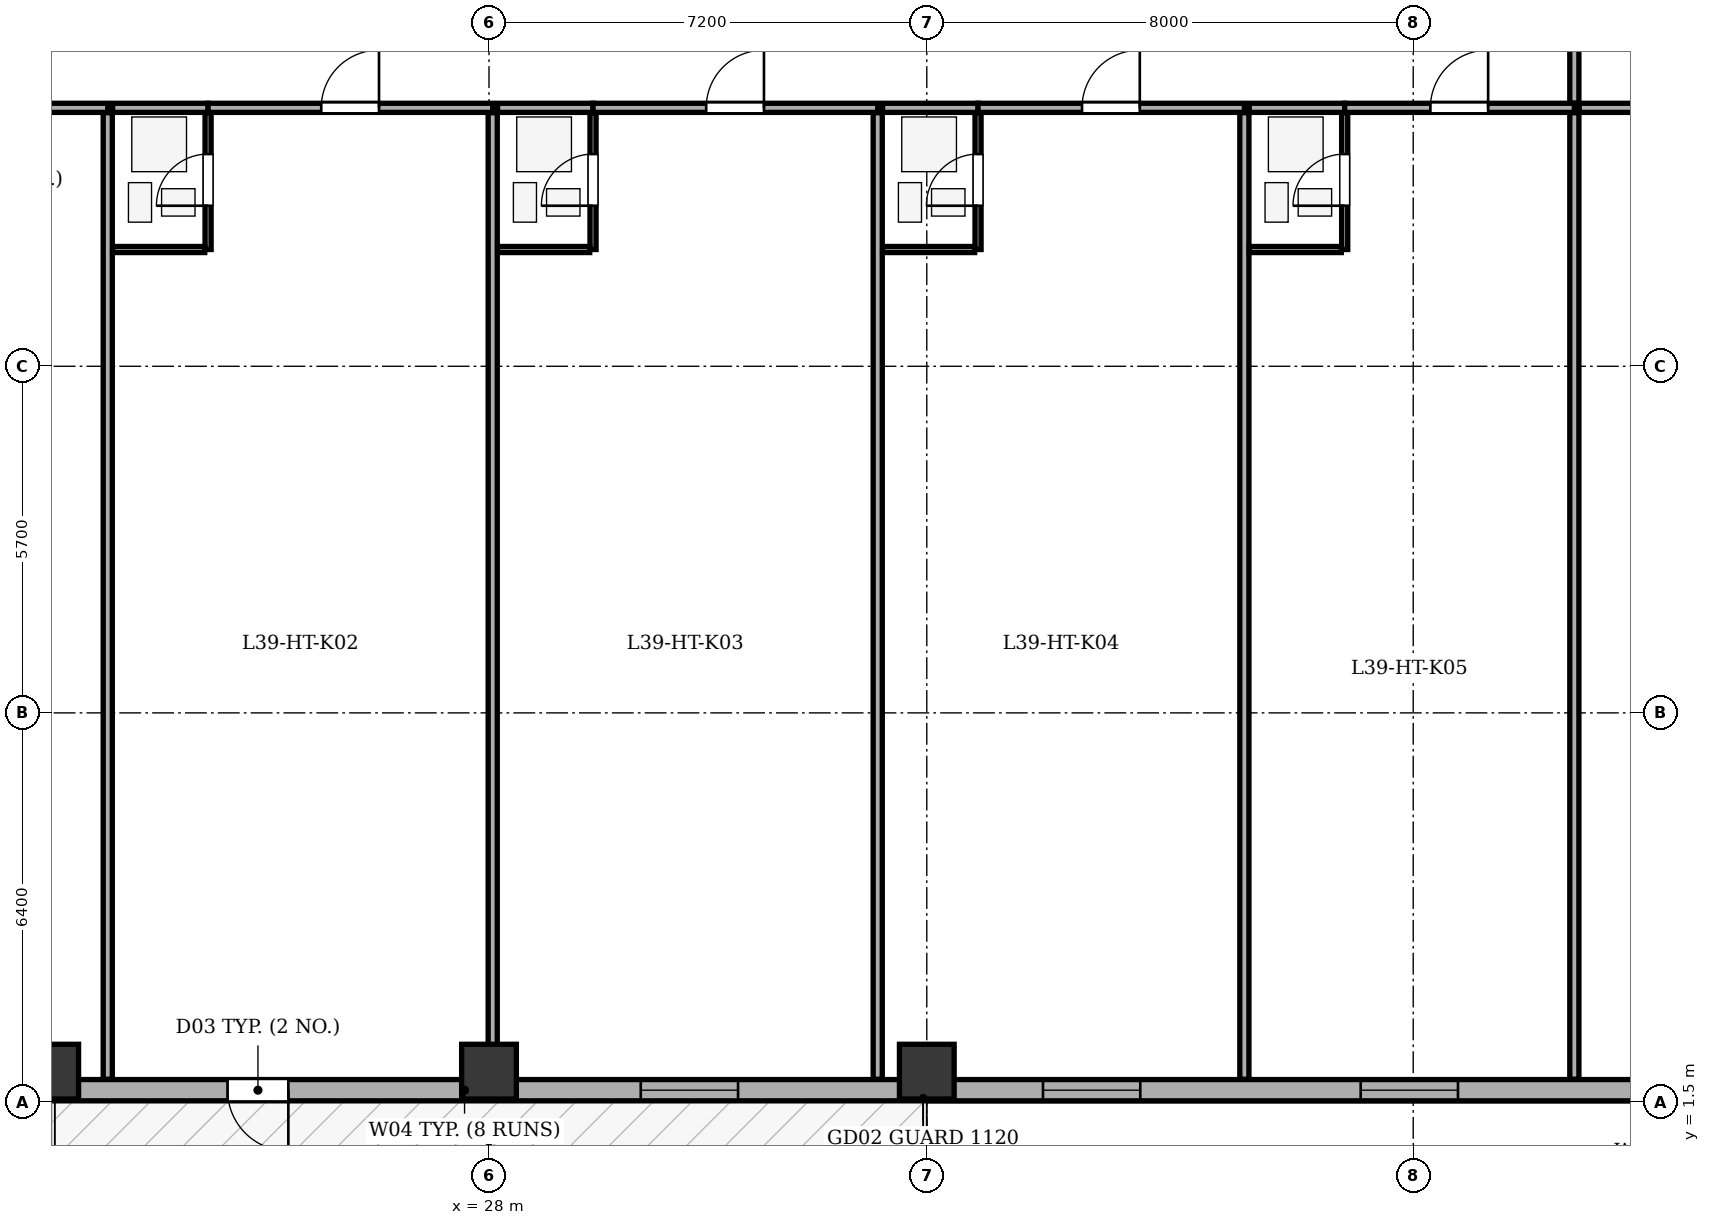
"""IFC4 building model, lengths in metres.
Left out: names, types, materials, properties, quantities, classifications, styles, units other than length and angle.
Written with IfcOpenShell. Run it as: python <this file> out.ifc"""

import sys

from ifc_helpers import new_model, si_unit, direction, frame, frame_2d, origin, origin_2d, place, context, subcontext, project, spatial, rectangle, extrude, element, fill, save


model = new_model("IFC4")
c1 = context("Model", 3, precision=1e-05, world=origin(), true_north=direction((0.0, 1.0)))
c2 = subcontext(c1, "Body", "Model", "MODEL_VIEW")
j1 = project(units=[si_unit("LENGTHUNIT", "METRE"), si_unit("PLANEANGLEUNIT", "RADIAN")], contexts=[c1])
p1 = place(None, origin())
s1 = spatial("IfcSite", under=j1, at=p1, CompositionType="ELEMENT")
p2 = place(p1, origin())
s2 = spatial("IfcBuilding", under=s1, at=p2, CompositionType="ELEMENT")
p3 = place(p2, frame((0.0, 0.0, 155.3)))
s3 = spatial("IfcBuildingStorey", under=s2, at=p3, CompositionType="ELEMENT", Elevation=155.3)
for number, where, z_axis, x_axis in (
    (1, (20.8, 2.0, 0.0), (0.0, 0.0, 1.0), (1.0, 0.0, 0.0)),
    (2, (28.0, 2.0, 0.0), (0.0, 0.0, 1.0), (1.0, 0.0, 0.0)),
    (3, (35.2, 2.0, 0.0), (0.0, 0.0, 1.0), (1.0, 0.0, 0.0)),
):
    element("IfcColumn", number, at=place(p3, frame(where, z_axis=z_axis, x_axis=x_axis)), inside=s3, PredefinedType="COLUMN", context=c2, shape_type="SweptSolid", body=[
        extrude(rectangle(XDim=0.9, YDim=0.9, at=origin_2d()), origin(), (0.0, 0.0, 1.0), 3.5),
    ])
p4 = place(p3, frame((50.7, 1.695, 0.0), z_axis=(0.0, 0.0, 1.0), x_axis=(-1.0, 0.0, 0.0)))
e4 = element("IfcWall", 4, at=p4, inside=s3, PredefinedType="STANDARD", context=c2, shape_type="SweptSolid", body=[
    extrude(rectangle(XDim=35.0, YDim=0.35, at=frame_2d((17.5, 0.0))), origin(), (0.0, 0.0, 1.0), 2.785),
])
p5 = place(p4, frame((26.0, 0.0, 0.0)))
e5 = element("IfcOpeningElement", 5, at=p5, cuts=e4, PredefinedType="OPENING", context=c2, shape_type="SweptSolid", body=[
    extrude(rectangle(XDim=1.0, YDim=2.02, at=frame_2d((0.5, 1.01))), frame((0.0, 0.185, 0.0), z_axis=(0.0, -1.0, 0.0), x_axis=(1.0, 0.0, 0.0)), (0.0, 0.0, 1.0), 0.37),
])
p6 = place(p4, frame((1.763, 0.0, 0.75)))
e6 = element("IfcOpeningElement", 6, at=p6, cuts=e4, PredefinedType="OPENING", context=c2, shape_type="SweptSolid", body=[
    extrude(rectangle(XDim=1.6, YDim=1.75, at=frame_2d((0.8, 0.875))), frame((0.0, 0.185, 0.0), z_axis=(0.0, -1.0, 0.0), x_axis=(1.0, 0.0, 0.0)), (0.0, 0.0, 1.0), 0.37),
])
p7 = place(p4, frame((6.764, 0.0, 0.75)))
e7 = element("IfcOpeningElement", 7, at=p7, cuts=e4, PredefinedType="OPENING", context=c2, shape_type="SweptSolid", body=[
    extrude(rectangle(XDim=1.6, YDim=1.75, at=frame_2d((0.8, 0.875))), frame((0.0, 0.185, 0.0), z_axis=(0.0, -1.0, 0.0), x_axis=(1.0, 0.0, 0.0)), (0.0, 0.0, 1.0), 0.37),
])
p8 = place(p4, frame((11.989, 0.0, 0.75)))
e8 = element("IfcOpeningElement", 8, at=p8, cuts=e4, PredefinedType="OPENING", context=c2, shape_type="SweptSolid", body=[
    extrude(rectangle(XDim=1.6, YDim=1.75, at=frame_2d((0.8, 0.875))), frame((0.0, 0.185, 0.0), z_axis=(0.0, -1.0, 0.0), x_axis=(1.0, 0.0, 0.0)), (0.0, 0.0, 1.0), 0.37),
])
p9 = place(p4, frame((18.604, 0.0, 0.75)))
e9 = element("IfcOpeningElement", 9, at=p9, cuts=e4, PredefinedType="OPENING", context=c2, shape_type="SweptSolid", body=[
    extrude(rectangle(XDim=1.6, YDim=1.75, at=frame_2d((0.8, 0.875))), frame((0.0, 0.185, 0.0), z_axis=(0.0, -1.0, 0.0), x_axis=(1.0, 0.0, 0.0)), (0.0, 0.0, 1.0), 0.37),
])
p10 = place(p4, frame((31.613, 0.0, 0.75)))
e10 = element("IfcOpeningElement", 10, at=p10, cuts=e4, PredefinedType="OPENING", context=c2, shape_type="SweptSolid", body=[
    extrude(rectangle(XDim=1.6, YDim=1.75, at=frame_2d((0.8, 0.875))), frame((0.0, 0.185, 0.0), z_axis=(0.0, -1.0, 0.0), x_axis=(1.0, 0.0, 0.0)), (0.0, 0.0, 1.0), 0.37),
])
p11 = place(p3, frame((17.35, 17.85, 0.0), z_axis=(0.0, 0.0, 1.0), x_axis=(1.0, 0.0, 0.0)))
e11 = element("IfcWall", 11, at=p11, inside=s3, PredefinedType="PARTITIONING", context=c2, shape_type="SweptSolid", body=[
    extrude(rectangle(XDim=4.38, YDim=0.15, at=frame_2d((2.19, 0.0))), origin(), (0.0, 0.0, 1.0), 3.2),
])
p12 = place(p11, frame((1.71, 0.0, 0.0)))
e12 = element("IfcOpeningElement", 12, at=p12, cuts=e11, PredefinedType="OPENING", context=c2, shape_type="SweptSolid", body=[
    extrude(rectangle(XDim=0.95, YDim=2.1, at=frame_2d((0.475, 1.05))), frame((0.0, 0.085, 0.0), z_axis=(0.0, -1.0, 0.0), x_axis=(1.0, 0.0, 0.0)), (0.0, 0.0, 1.0), 0.17),
])
p13 = place(p3, frame((21.73, 1.875, 0.0), z_axis=(0.0, 0.0, 1.0), x_axis=(0.0, 1.0, 0.0)))
e13 = element("IfcWall", 13, at=p13, inside=s3, PredefinedType="PARTITIONING", context=c2, shape_type="SweptSolid", body=[
    extrude(rectangle(XDim=15.895, YDim=0.15, at=frame_2d((7.948, 0.0))), origin(), (0.0, 0.0, 1.0), 3.2),
])
p14 = place(p3, frame((21.81, 17.85, 0.0), z_axis=(0.0, 0.0, 1.0), x_axis=(1.0, 0.0, 0.0)))
e14 = element("IfcWall", 14, at=p14, inside=s3, PredefinedType="PARTITIONING", context=c2, shape_type="SweptSolid", body=[
    extrude(rectangle(XDim=1.57, YDim=0.15, at=frame_2d((0.785, 0.0))), origin(), (0.0, 0.0, 1.0), 3.2),
])
p15 = place(p3, frame((23.38, 17.85, 0.0), z_axis=(0.0, 0.0, 1.0), x_axis=(1.0, 0.0, 0.0)))
e15 = element("IfcWall", 15, at=p15, inside=s3, PredefinedType="PARTITIONING", context=c2, shape_type="SweptSolid", body=[
    extrude(rectangle(XDim=4.681, YDim=0.15, at=frame_2d((2.341, 0.0))), origin(), (0.0, 0.0, 1.0), 3.2),
])
p16 = place(p15, frame((1.861, 0.0, 0.0)))
e16 = element("IfcOpeningElement", 16, at=p16, cuts=e15, PredefinedType="OPENING", context=c2, shape_type="SweptSolid", body=[
    extrude(rectangle(XDim=0.95, YDim=2.1, at=frame_2d((0.475, 1.05))), frame((0.0, 0.085, 0.0), z_axis=(0.0, -1.0, 0.0), x_axis=(1.0, 0.0, 0.0)), (0.0, 0.0, 1.0), 0.17),
])
p17 = place(p3, frame((23.38, 15.52, 0.0), z_axis=(0.0, 0.0, 1.0), x_axis=(0.0, 1.0, 0.0)))
e17 = element("IfcWall", 17, at=p17, inside=s3, PredefinedType="PARTITIONING", context=c2, shape_type="SweptSolid", body=[
    extrude(rectangle(XDim=2.25, YDim=0.1, at=frame_2d((1.125, 0.0))), origin(), (0.0, 0.0, 1.0), 3.2),
])
p18 = place(p17, frame((0.72, 0.0, 0.0)))
e18 = element("IfcOpeningElement", 18, at=p18, cuts=e17, PredefinedType="OPENING", context=c2, shape_type="SweptSolid", body=[
    extrude(rectangle(XDim=0.85, YDim=2.05, at=frame_2d((0.425, 1.025))), frame((0.0, 0.06, 0.0), z_axis=(0.0, -1.0, 0.0), x_axis=(1.0, 0.0, 0.0)), (0.0, 0.0, 1.0), 0.12),
])
p19 = place(p3, frame((21.81, 15.52, 0.0), z_axis=(0.0, 0.0, 1.0), x_axis=(1.0, 0.0, 0.0)))
e19 = element("IfcWall", 19, at=p19, inside=s3, PredefinedType="PARTITIONING", context=c2, shape_type="SweptSolid", body=[
    extrude(rectangle(XDim=1.515, YDim=0.1, at=frame_2d((0.757, 0.0))), origin(), (0.0, 0.0, 1.0), 3.2),
])
p20 = place(p3, frame((28.061, 1.875, 0.0), z_axis=(0.0, 0.0, 1.0), x_axis=(0.0, 1.0, 0.0)))
e20 = element("IfcWall", 20, at=p20, inside=s3, PredefinedType="PARTITIONING", context=c2, shape_type="SweptSolid", body=[
    extrude(rectangle(XDim=15.895, YDim=0.15, at=frame_2d((7.948, 0.0))), origin(), (0.0, 0.0, 1.0), 2.535),
])
p21 = place(p3, frame((28.141, 17.85, 0.0), z_axis=(0.0, 0.0, 1.0), x_axis=(1.0, 0.0, 0.0)))
e21 = element("IfcWall", 21, at=p21, inside=s3, PredefinedType="PARTITIONING", context=c2, shape_type="SweptSolid", body=[
    extrude(rectangle(XDim=1.57, YDim=0.15, at=frame_2d((0.785, 0.0))), origin(), (0.0, 0.0, 1.0), 3.2),
])
p22 = place(p3, frame((29.711, 17.85, 0.0), z_axis=(0.0, 0.0, 1.0), x_axis=(1.0, 0.0, 0.0)))
e22 = element("IfcWall", 22, at=p22, inside=s3, PredefinedType="PARTITIONING", context=c2, shape_type="SweptSolid", body=[
    extrude(rectangle(XDim=4.682, YDim=0.15, at=frame_2d((2.341, 0.0))), origin(), (0.0, 0.0, 1.0), 3.2),
])
p23 = place(p22, frame((1.861, 0.0, 0.0)))
e23 = element("IfcOpeningElement", 23, at=p23, cuts=e22, PredefinedType="OPENING", context=c2, shape_type="SweptSolid", body=[
    extrude(rectangle(XDim=0.95, YDim=2.1, at=frame_2d((0.475, 1.05))), frame((0.0, 0.085, 0.0), z_axis=(0.0, -1.0, 0.0), x_axis=(1.0, 0.0, 0.0)), (0.0, 0.0, 1.0), 0.17),
])
p24 = place(p3, frame((29.711, 15.52, 0.0), z_axis=(0.0, 0.0, 1.0), x_axis=(0.0, 1.0, 0.0)))
e24 = element("IfcWall", 24, at=p24, inside=s3, PredefinedType="PARTITIONING", context=c2, shape_type="SweptSolid", body=[
    extrude(rectangle(XDim=2.25, YDim=0.1, at=frame_2d((1.125, 0.0))), origin(), (0.0, 0.0, 1.0), 2.785),
])
p25 = place(p24, frame((0.72, 0.0, 0.0)))
e25 = element("IfcOpeningElement", 25, at=p25, cuts=e24, PredefinedType="OPENING", context=c2, shape_type="SweptSolid", body=[
    extrude(rectangle(XDim=0.85, YDim=2.05, at=frame_2d((0.425, 1.025))), frame((0.0, 0.06, 0.0), z_axis=(0.0, -1.0, 0.0), x_axis=(1.0, 0.0, 0.0)), (0.0, 0.0, 1.0), 0.12),
])
p26 = place(p3, frame((28.141, 15.52, 0.0), z_axis=(0.0, 0.0, 1.0), x_axis=(1.0, 0.0, 0.0)))
e26 = element("IfcWall", 26, at=p26, inside=s3, PredefinedType="PARTITIONING", context=c2, shape_type="SweptSolid", body=[
    extrude(rectangle(XDim=1.515, YDim=0.1, at=frame_2d((0.757, 0.0))), origin(), (0.0, 0.0, 1.0), 3.2),
])
p27 = place(p3, frame((34.393, 1.875, 0.0), z_axis=(0.0, 0.0, 1.0), x_axis=(0.0, 1.0, 0.0)))
e27 = element("IfcWall", 27, at=p27, inside=s3, PredefinedType="PARTITIONING", context=c2, shape_type="SweptSolid", body=[
    extrude(rectangle(XDim=15.895, YDim=0.15, at=frame_2d((7.948, 0.0))), origin(), (0.0, 0.0, 1.0), 3.2),
])
p28 = place(p3, frame((34.473, 17.85, 0.0), z_axis=(0.0, 0.0, 1.0), x_axis=(1.0, 0.0, 0.0)))
e28 = element("IfcWall", 28, at=p28, inside=s3, PredefinedType="PARTITIONING", context=c2, shape_type="SweptSolid", body=[
    extrude(rectangle(XDim=1.57, YDim=0.15, at=frame_2d((0.785, 0.0))), origin(), (0.0, 0.0, 1.0), 3.2),
])
p29 = place(p3, frame((36.043, 17.85, 0.0), z_axis=(0.0, 0.0, 1.0), x_axis=(1.0, 0.0, 0.0)))
e29 = element("IfcWall", 29, at=p29, inside=s3, PredefinedType="PARTITIONING", context=c2, shape_type="SweptSolid", body=[
    extrude(rectangle(XDim=4.38, YDim=0.15, at=frame_2d((2.19, 0.0))), origin(), (0.0, 0.0, 1.0), 3.2),
])
p30 = place(p29, frame((1.71, 0.0, 0.0)))
e30 = element("IfcOpeningElement", 30, at=p30, cuts=e29, PredefinedType="OPENING", context=c2, shape_type="SweptSolid", body=[
    extrude(rectangle(XDim=0.95, YDim=2.1, at=frame_2d((0.475, 1.05))), frame((0.0, 0.085, 0.0), z_axis=(0.0, -1.0, 0.0), x_axis=(1.0, 0.0, 0.0)), (0.0, 0.0, 1.0), 0.17),
])
p31 = place(p3, frame((36.043, 15.52, 0.0), z_axis=(0.0, 0.0, 1.0), x_axis=(0.0, 1.0, 0.0)))
e31 = element("IfcWall", 31, at=p31, inside=s3, PredefinedType="PARTITIONING", context=c2, shape_type="SweptSolid", body=[
    extrude(rectangle(XDim=2.25, YDim=0.1, at=frame_2d((1.125, 0.0))), origin(), (0.0, 0.0, 1.0), 3.2),
])
p32 = place(p31, frame((0.72, 0.0, 0.0)))
e32 = element("IfcOpeningElement", 32, at=p32, cuts=e31, PredefinedType="OPENING", context=c2, shape_type="SweptSolid", body=[
    extrude(rectangle(XDim=0.85, YDim=2.05, at=frame_2d((0.425, 1.025))), frame((0.0, 0.06, 0.0), z_axis=(0.0, -1.0, 0.0), x_axis=(1.0, 0.0, 0.0)), (0.0, 0.0, 1.0), 0.12),
])
p33 = place(p3, frame((34.473, 15.52, 0.0), z_axis=(0.0, 0.0, 1.0), x_axis=(1.0, 0.0, 0.0)))
e33 = element("IfcWall", 33, at=p33, inside=s3, PredefinedType="PARTITIONING", context=c2, shape_type="SweptSolid", body=[
    extrude(rectangle(XDim=1.515, YDim=0.1, at=frame_2d((0.758, 0.0))), origin(), (0.0, 0.0, 1.0), 3.2),
])
p34 = place(p3, frame((40.423, 1.875, 0.0), z_axis=(0.0, 0.0, 1.0), x_axis=(0.0, 1.0, 0.0)))
e34 = element("IfcWall", 34, at=p34, inside=s3, PredefinedType="PARTITIONING", context=c2, shape_type="SweptSolid", body=[
    extrude(rectangle(XDim=15.895, YDim=0.15, at=frame_2d((7.948, 0.0))), origin(), (0.0, 0.0, 1.0), 3.2),
])
p35 = place(p3, frame((40.503, 17.85, 0.0), z_axis=(0.0, 0.0, 1.0), x_axis=(1.0, 0.0, 0.0)))
e35 = element("IfcWall", 35, at=p35, inside=s3, PredefinedType="PARTITIONING", context=c2, shape_type="SweptSolid", body=[
    extrude(rectangle(XDim=1.57, YDim=0.15, at=frame_2d((0.785, 0.0))), origin(), (0.0, 0.0, 1.0), 3.2),
])
p36 = place(p3, frame((42.073, 17.85, 0.0), z_axis=(0.0, 0.0, 1.0), x_axis=(1.0, 0.0, 0.0)))
e36 = element("IfcWall", 36, at=p36, inside=s3, PredefinedType="PARTITIONING", context=c2, shape_type="SweptSolid", body=[
    extrude(rectangle(XDim=3.777, YDim=0.15, at=frame_2d((1.889, 0.0))), origin(), (0.0, 0.0, 1.0), 3.2),
])
p37 = place(p36, frame((1.409, 0.0, 0.0)))
e37 = element("IfcOpeningElement", 37, at=p37, cuts=e36, PredefinedType="OPENING", context=c2, shape_type="SweptSolid", body=[
    extrude(rectangle(XDim=0.95, YDim=2.1, at=frame_2d((0.475, 1.05))), frame((0.0, 0.085, 0.0), z_axis=(0.0, -1.0, 0.0), x_axis=(1.0, 0.0, 0.0)), (0.0, 0.0, 1.0), 0.17),
])
p38 = place(p3, frame((42.073, 15.52, 0.0), z_axis=(0.0, 0.0, 1.0), x_axis=(0.0, 1.0, 0.0)))
e38 = element("IfcWall", 38, at=p38, inside=s3, PredefinedType="PARTITIONING", context=c2, shape_type="SweptSolid", body=[
    extrude(rectangle(XDim=2.25, YDim=0.1, at=frame_2d((1.125, 0.0))), origin(), (0.0, 0.0, 1.0), 3.2),
])
p39 = place(p38, frame((0.72, 0.0, 0.0)))
e39 = element("IfcOpeningElement", 39, at=p39, cuts=e38, PredefinedType="OPENING", context=c2, shape_type="SweptSolid", body=[
    extrude(rectangle(XDim=0.85, YDim=2.05, at=frame_2d((0.425, 1.025))), frame((0.0, 0.06, 0.0), z_axis=(0.0, -1.0, 0.0), x_axis=(1.0, 0.0, 0.0)), (0.0, 0.0, 1.0), 0.12),
])
p40 = place(p3, frame((40.503, 15.52, 0.0), z_axis=(0.0, 0.0, 1.0), x_axis=(1.0, 0.0, 0.0)))
e40 = element("IfcWall", 40, at=p40, inside=s3, PredefinedType="PARTITIONING", context=c2, shape_type="SweptSolid", body=[
    extrude(rectangle(XDim=1.515, YDim=0.1, at=frame_2d((0.758, 0.0))), origin(), (0.0, 0.0, 1.0), 3.2),
])
p41 = place(p3, frame((45.85, 1.875, 0.0), z_axis=(0.0, 0.0, 1.0), x_axis=(0.0, 1.0, 0.0)))
e41 = element("IfcWall", 41, at=p41, inside=s3, PredefinedType="PARTITIONING", context=c2, shape_type="SweptSolid", body=[
    extrude(rectangle(XDim=15.895, YDim=0.15, at=frame_2d((7.948, 0.0))), origin(), (0.0, 0.0, 1.0), 3.2),
])
p42 = place(p3, frame((45.93, 17.85, 0.0), z_axis=(0.0, 0.0, 1.0), x_axis=(1.0, 0.0, 0.0)))
e42 = element("IfcWall", 42, at=p42, inside=s3, PredefinedType="PARTITIONING", context=c2, shape_type="SweptSolid", body=[
    extrude(rectangle(XDim=9.395, YDim=0.15, at=frame_2d((4.698, 0.0))), origin(), (0.0, 0.0, 1.0), 3.2),
])
p43 = place(p3, frame((45.85, 17.93, 0.0), z_axis=(0.0, 0.0, 1.0), x_axis=(0.0, 1.0, 0.0)))
e43 = element("IfcWall", 43, at=p43, inside=s3, PredefinedType="PARTITIONING", context=c2, shape_type="SweptSolid", body=[
    extrude(rectangle(XDim=6.07, YDim=0.15, at=frame_2d((3.035, 0.0))), origin(), (0.0, 0.0, 1.0), 3.2),
])
p44 = place(p43, frame((2.515, 0.0, 0.0)))
e44 = element("IfcOpeningElement", 44, at=p44, cuts=e43, PredefinedType="OPENING", context=c2, shape_type="SweptSolid", body=[
    extrude(rectangle(XDim=0.95, YDim=2.1, at=frame_2d((0.475, 1.05))), frame((0.0, 0.085, 0.0), z_axis=(0.0, -1.0, 0.0), x_axis=(1.0, 0.0, 0.0)), (0.0, 0.0, 1.0), 0.17),
])
p45 = place(p5, origin())
e45 = element("IfcDoor", 45, at=p45, inside=s3, OperationType="SINGLE_SWING_LEFT", PredefinedType="DOOR", context=c2, shape_type="SweptSolid", body=[
    extrude(rectangle(XDim=1.0, YDim=2.02, at=frame_2d((0.5, 1.01))), frame((0.0, 0.025, 0.0), z_axis=(0.0, -1.0, 0.0), x_axis=(1.0, 0.0, 0.0)), (0.0, 0.0, 1.0), 0.05),
])
fill(e5, e45)
p46 = place(p7, origin())
e46 = element("IfcWindow", 46, at=p46, inside=s3, PartitioningType="SINGLE_PANEL", PredefinedType="WINDOW", context=c2, shape_type="SweptSolid", body=[
    extrude(rectangle(XDim=1.6, YDim=1.75, at=frame_2d((0.8, 0.875))), frame((0.0, -0.01, 0.0), z_axis=(0.0, -1.0, 0.0), x_axis=(1.0, 0.0, 0.0)), (0.0, 0.0, 1.0), 0.06),
])
fill(e7, e46)
p47 = place(p8, origin())
e47 = element("IfcWindow", 47, at=p47, inside=s3, PartitioningType="SINGLE_PANEL", PredefinedType="WINDOW", context=c2, shape_type="SweptSolid", body=[
    extrude(rectangle(XDim=1.6, YDim=1.75, at=frame_2d((0.8, 0.875))), frame((0.0, -0.01, 0.0), z_axis=(0.0, -1.0, 0.0), x_axis=(1.0, 0.0, 0.0)), (0.0, 0.0, 1.0), 0.06),
])
fill(e8, e47)
p48 = place(p9, origin())
e48 = element("IfcWindow", 48, at=p48, inside=s3, PartitioningType="SINGLE_PANEL", PredefinedType="WINDOW", context=c2, shape_type="SweptSolid", body=[
    extrude(rectangle(XDim=1.6, YDim=1.75, at=frame_2d((0.8, 0.875))), frame((0.0, -0.01, 0.0), z_axis=(0.0, -1.0, 0.0), x_axis=(1.0, 0.0, 0.0)), (0.0, 0.0, 1.0), 0.06),
])
fill(e9, e48)
p49 = place(p18, origin())
e49 = element("IfcDoor", 49, at=p49, inside=s3, OperationType="SINGLE_SWING_LEFT", PredefinedType="DOOR", context=c2, shape_type="SweptSolid", body=[
    extrude(rectangle(XDim=0.85, YDim=2.05, at=frame_2d((0.425, 1.025))), frame((0.0, 0.025, 0.0), z_axis=(0.0, -1.0, 0.0), x_axis=(1.0, 0.0, 0.0)), (0.0, 0.0, 1.0), 0.05),
])
fill(e18, e49)
p50 = place(p16, origin())
e50 = element("IfcDoor", 50, at=p50, inside=s3, OperationType="SINGLE_SWING_RIGHT", PredefinedType="DOOR", context=c2, shape_type="SweptSolid", body=[
    extrude(rectangle(XDim=0.95, YDim=2.1, at=frame_2d((0.475, 1.05))), frame((0.0, 0.025, 0.0), z_axis=(0.0, -1.0, 0.0), x_axis=(1.0, 0.0, 0.0)), (0.0, 0.0, 1.0), 0.05),
])
fill(e16, e50)
p51 = place(p25, origin())
e51 = element("IfcDoor", 51, at=p51, inside=s3, OperationType="SINGLE_SWING_LEFT", PredefinedType="DOOR", context=c2, shape_type="SweptSolid", body=[
    extrude(rectangle(XDim=0.85, YDim=2.05, at=frame_2d((0.425, 1.025))), frame((0.0, 0.025, 0.0), z_axis=(0.0, -1.0, 0.0), x_axis=(1.0, 0.0, 0.0)), (0.0, 0.0, 1.0), 0.05),
])
fill(e25, e51)
p52 = place(p23, origin())
e52 = element("IfcDoor", 52, at=p52, inside=s3, OperationType="SINGLE_SWING_RIGHT", PredefinedType="DOOR", context=c2, shape_type="SweptSolid", body=[
    extrude(rectangle(XDim=0.95, YDim=2.1, at=frame_2d((0.475, 1.05))), frame((0.0, 0.025, 0.0), z_axis=(0.0, -1.0, 0.0), x_axis=(1.0, 0.0, 0.0)), (0.0, 0.0, 1.0), 0.05),
])
fill(e23, e52)
p53 = place(p32, origin())
e53 = element("IfcDoor", 53, at=p53, inside=s3, OperationType="SINGLE_SWING_LEFT", PredefinedType="DOOR", context=c2, shape_type="SweptSolid", body=[
    extrude(rectangle(XDim=0.85, YDim=2.05, at=frame_2d((0.425, 1.025))), frame((0.0, 0.025, 0.0), z_axis=(0.0, -1.0, 0.0), x_axis=(1.0, 0.0, 0.0)), (0.0, 0.0, 1.0), 0.05),
])
fill(e32, e53)
p54 = place(p30, origin())
e54 = element("IfcDoor", 54, at=p54, inside=s3, OperationType="SINGLE_SWING_RIGHT", PredefinedType="DOOR", context=c2, shape_type="SweptSolid", body=[
    extrude(rectangle(XDim=0.95, YDim=2.1, at=frame_2d((0.475, 1.05))), frame((0.0, 0.025, 0.0), z_axis=(0.0, -1.0, 0.0), x_axis=(1.0, 0.0, 0.0)), (0.0, 0.0, 1.0), 0.05),
])
fill(e30, e54)
p55 = place(p39, origin())
e55 = element("IfcDoor", 55, at=p55, inside=s3, OperationType="SINGLE_SWING_LEFT", PredefinedType="DOOR", context=c2, shape_type="SweptSolid", body=[
    extrude(rectangle(XDim=0.85, YDim=2.05, at=frame_2d((0.425, 1.025))), frame((0.0, 0.025, 0.0), z_axis=(0.0, -1.0, 0.0), x_axis=(1.0, 0.0, 0.0)), (0.0, 0.0, 1.0), 0.05),
])
fill(e39, e55)
p56 = place(p37, origin())
e56 = element("IfcDoor", 56, at=p56, inside=s3, OperationType="SINGLE_SWING_RIGHT", PredefinedType="DOOR", context=c2, shape_type="SweptSolid", body=[
    extrude(rectangle(XDim=0.95, YDim=2.1, at=frame_2d((0.475, 1.05))), frame((0.0, 0.025, 0.0), z_axis=(0.0, -1.0, 0.0), x_axis=(1.0, 0.0, 0.0)), (0.0, 0.0, 1.0), 0.05),
])
fill(e37, e56)
save(model, sys.argv[1])
